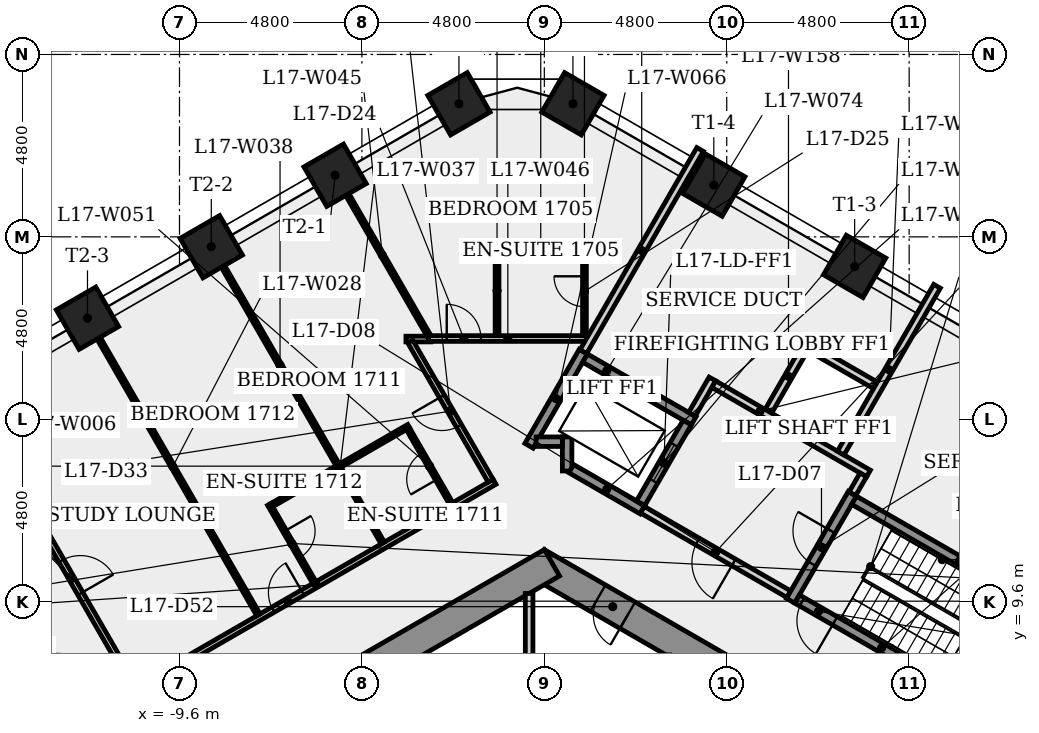
"""IFC4 building model, lengths in metres.
Left out: names, types, materials, properties, quantities, classifications, styles, units other than length and angle.
Written with IfcOpenShell. Run it as: python <this file> out.ifc"""

import sys

from ifc_helpers import new_model, si_unit, direction, frame, frame_2d, origin, origin_2d, place, context, subcontext, project, spatial, rectangle, extrude, element, fill, save


model = new_model("IFC4")
c1 = context("Model", 3, precision=1e-05, world=origin(), true_north=direction((0.0, 1.0)))
c2 = subcontext(c1, "Body", "Model", "MODEL_VIEW")
j1 = project(units=[si_unit("LENGTHUNIT", "METRE"), si_unit("PLANEANGLEUNIT", "RADIAN")], contexts=[c1])
p1 = place(None, origin())
s1 = spatial("IfcSite", under=j1, at=p1, CompositionType="ELEMENT")
p2 = place(p1, origin())
s2 = spatial("IfcBuilding", under=s1, at=p2, CompositionType="ELEMENT")
p3 = place(p2, frame((0.0, 0.0, 66.3)))
s3 = spatial("IfcBuildingStorey", under=s2, at=p3, CompositionType="ELEMENT", Elevation=66.3)
p4 = place(p3, frame((9.3, 5.138, 0.0), z_axis=(0.0, 0.0, 1.0), x_axis=(-0.866023993627, 0.500002442456, 0.0)))
e1 = element("IfcWall", 1, at=p4, inside=s3, PredefinedType="SHEAR", context=c2, shape_type="SweptSolid", body=[
    extrude(rectangle(XDim=10.97, YDim=0.8, at=frame_2d((5.485, 0.0))), origin(), (0.0, 0.0, 1.0), 4.0),
])
p5 = place(p4, frame((8.21, 0.0, 0.0)))
e2 = element("IfcOpeningElement", 2, at=p5, cuts=e1, PredefinedType="OPENING", context=c2, shape_type="SweptSolid", body=[
    extrude(rectangle(XDim=0.9, YDim=2.1, at=frame_2d((0.45, 1.05))), frame((0.0, 0.41, 0.0), z_axis=(0.0, -1.0, 0.0), x_axis=(1.0, 0.0, 0.0)), (0.0, 0.0, 1.0), 0.82),
])
p6 = place(p4, frame((2.126, 0.0, 0.0)))
e3 = element("IfcOpeningElement", 3, at=p6, cuts=e1, PredefinedType="OPENING", context=c2, shape_type="SweptSolid", body=[
    extrude(rectangle(XDim=0.9, YDim=2.1, at=frame_2d((0.45, 1.05))), frame((0.0, 0.41, 0.0), z_axis=(0.0, -1.0, 0.0), x_axis=(1.0, 0.0, 0.0)), (0.0, 0.0, 1.0), 0.82),
])
p7 = place(p3, frame((0.2, 10.623, 0.0), z_axis=(0.0, 0.0, 1.0), x_axis=(-0.866023993627, -0.500002442456, 0.0)))
e4 = element("IfcWall", 4, at=p7, inside=s3, PredefinedType="SHEAR", context=c2, shape_type="SweptSolid", body=[
    extrude(rectangle(XDim=10.97, YDim=0.8, at=frame_2d((5.485, 0.0))), origin(), (0.0, 0.0, 1.0), 4.0),
])
p8 = place(p7, frame((6.877, 0.0, 0.0)))
e5 = element("IfcOpeningElement", 5, at=p8, cuts=e4, PredefinedType="OPENING", context=c2, shape_type="SweptSolid", body=[
    extrude(rectangle(XDim=0.9, YDim=2.1, at=frame_2d((0.45, 1.05))), frame((0.0, 0.41, 0.0), z_axis=(0.0, -1.0, 0.0), x_axis=(1.0, 0.0, 0.0)), (0.0, 0.0, 1.0), 0.82),
])
for number, where, z_axis, x_axis in (
    (6, (8.166, 18.423, 0.0), (0.0, 0.0, 1.0), (0.5, 0.866, 0.0)),
    (7, (4.459, 20.563, 0.0), (0.0, 0.0, 1.0), (0.5, 0.866, 0.0)),
    (8, (0.753, 22.703, 0.0), (0.0, 0.0, 1.0), (0.5, 0.866, 0.0)),
    (9, (-2.247, 22.703, 0.0), (0.0, 0.0, 1.0), (-0.5, 0.866, 0.0)),
    (10, (-5.505, 20.822, 0.0), (0.0, 0.0, 1.0), (-0.5, 0.866, 0.0)),
    (11, (-8.763, 18.94, 0.0), (0.0, 0.0, 1.0), (-0.5, 0.866, 0.0)),
    (12, (-12.021, 17.06, 0.0), (0.0, 0.0, 1.0), (-0.5, 0.866, 0.0)),
):
    element("IfcColumn", number, at=place(p3, frame(where, z_axis=z_axis, x_axis=x_axis)), inside=s3, PredefinedType="COLUMN", context=c2, shape_type="SweptSolid", body=[
        extrude(rectangle(XDim=1.2, YDim=1.2, at=origin_2d()), origin(), (0.0, 0.0, 1.0), 4.0),
    ])
p9 = place(p3, frame((-14.161, 13.192, 0.0), z_axis=(0.0, 0.0, 1.0), x_axis=(0.500005038635, -0.866022494708, 0.0)))
e13 = element("IfcWall", 13, at=p9, inside=s3, PredefinedType="PARTITIONING", context=c2, shape_type="SweptSolid", body=[
    extrude(rectangle(XDim=6.88, YDim=0.15, at=frame_2d((3.44, 0.0))), origin(), (0.0, 0.0, 1.0), 3.6),
])
p10 = place(p9, frame((2.903, 0.0, 0.0)))
e14 = element("IfcOpeningElement", 14, at=p10, cuts=e13, PredefinedType="OPENING", context=c2, shape_type="SweptSolid", body=[
    extrude(rectangle(XDim=1.0, YDim=2.1, at=frame_2d((0.5, 1.05))), frame((0.0, 0.085, 0.0), z_axis=(0.0, -1.0, 0.0), x_axis=(1.0, 0.0, 0.0)), (0.0, 0.0, 1.0), 0.17),
])
p11 = place(p3, frame((-10.693, 7.336, 0.0), z_axis=(0.0, 0.0, 1.0), x_axis=(0.866018601944, 0.500011780947, 0.0)))
e15 = element("IfcWall", 15, at=p11, inside=s3, PredefinedType="PARTITIONING", context=c2, shape_type="SweptSolid", body=[
    extrude(rectangle(XDim=10.835, YDim=0.15, at=frame_2d((5.417, 0.0))), origin(), (0.0, 0.0, 1.0), 3.6),
])
p12 = place(p11, frame((4.103, 0.0, 0.0)))
e16 = element("IfcOpeningElement", 16, at=p12, cuts=e15, PredefinedType="OPENING", context=c2, shape_type="SweptSolid", body=[
    extrude(rectangle(XDim=0.9, YDim=2.1, at=frame_2d((0.45, 1.05))), frame((0.0, 0.085, 0.0), z_axis=(0.0, -1.0, 0.0), x_axis=(1.0, 0.0, 0.0)), (0.0, 0.0, 1.0), 0.17),
])
p13 = place(p3, frame((-7.523, 9.253, 0.0), z_axis=(0.0, 0.0, 1.0), x_axis=(-0.500009404554, 0.866019973994, 0.0)))
e17 = element("IfcWall", 17, at=p13, inside=s3, PredefinedType="PARTITIONING", context=c2, shape_type="SweptSolid", body=[
    extrude(rectangle(XDim=9.01, YDim=0.1, at=frame_2d((4.505, 0.0))), origin(), (0.0, 0.0, 1.0), 3.6),
])
p14 = place(p3, frame((-7.239, 12.16, 0.0), z_axis=(0.0, 0.0, 1.0), x_axis=(0.499986429846, -0.866033238375, 0.0)))
e18 = element("IfcWall", 18, at=p14, inside=s3, PredefinedType="PARTITIONING", context=c2, shape_type="SweptSolid", body=[
    extrude(rectangle(XDim=2.375, YDim=0.1, at=frame_2d((1.188, 0.0))), origin(), (0.0, 0.0, 1.0), 3.6),
])
p15 = place(p14, frame((0.812, 0.0, 0.0)))
e19 = element("IfcOpeningElement", 19, at=p15, cuts=e18, PredefinedType="OPENING", context=c2, shape_type="SweptSolid", body=[
    extrude(rectangle(XDim=0.8, YDim=2.1, at=frame_2d((0.4, 1.05))), frame((0.0, 0.06, 0.0), z_axis=(0.0, -1.0, 0.0), x_axis=(1.0, 0.0, 0.0)), (0.0, 0.0, 1.0), 0.12),
])
p16 = place(p3, frame((-7.17, 12.141, 0.0), z_axis=(0.0, 0.0, 1.0), x_axis=(0.866036909293, 0.499980071345, 0.0)))
e20 = element("IfcWall", 20, at=p16, inside=s3, PredefinedType="PARTITIONING", context=c2, shape_type="SweptSolid", body=[
    extrude(rectangle(XDim=4.156, YDim=0.1, at=frame_2d((2.078, 0.0))), origin(), (0.0, 0.0, 1.0), 3.6),
])
p17 = place(p3, frame((-8.756, 18.945, 0.0), z_axis=(0.0, 0.0, 1.0), x_axis=(0.500009404554, -0.866019973994, 0.0)))
e21 = element("IfcWall", 21, at=p17, inside=s3, PredefinedType="PARTITIONING", context=c2, shape_type="SweptSolid", body=[
    extrude(rectangle(XDim=9.01, YDim=0.1, at=frame_2d((4.505, 0.0))), origin(), (0.0, 0.0, 1.0), 3.6),
])
p18 = place(p3, frame((-3.641, 16.511, 0.0), z_axis=(0.0, 0.0, 1.0), x_axis=(1.0, 0.0, 0.0)))
e22 = element("IfcWall", 22, at=p18, inside=s3, PredefinedType="PARTITIONING", context=c2, shape_type="SweptSolid", body=[
    extrude(rectangle(XDim=0.652, YDim=0.15, at=frame_2d((0.326, 0.0))), origin(), (0.0, 0.0, 1.0), 3.6),
])
p19 = place(p3, frame((-3.034, 16.59, 0.0), z_axis=(0.0, 0.0, 1.0), x_axis=(-0.499975448907, 0.8660395779, 0.0)))
e23 = element("IfcWall", 23, at=p19, inside=s3, PredefinedType="PARTITIONING", context=c2, shape_type="SweptSolid", body=[
    extrude(rectangle(XDim=4.901, YDim=0.1, at=frame_2d((2.45, 0.0))), origin(), (0.0, 0.0, 1.0), 3.6),
])
p20 = place(p3, frame((-3.046, 16.525, 0.0), z_axis=(0.0, 0.0, 1.0), x_axis=(1.0, 0.0, 0.0)))
e24 = element("IfcWall", 24, at=p20, inside=s3, PredefinedType="PARTITIONING", context=c2, shape_type="SweptSolid", body=[
    extrude(rectangle(XDim=4.173, YDim=0.15, at=frame_2d((2.086, 0.0))), origin(), (0.0, 0.0, 1.0), 3.6),
])
p21 = place(p20, frame((0.479, 0.0, 0.0)))
e25 = element("IfcOpeningElement", 25, at=p21, cuts=e24, PredefinedType="OPENING", context=c2, shape_type="SweptSolid", body=[
    extrude(rectangle(XDim=0.9, YDim=2.1, at=frame_2d((0.45, 1.05))), frame((0.0, 0.085, 0.0), z_axis=(0.0, -1.0, 0.0), x_axis=(1.0, 0.0, 0.0)), (0.0, 0.0, 1.0), 0.17),
])
p22 = place(p3, frame((-2.452, 12.181, 0.0), z_axis=(0.0, 0.0, 1.0), x_axis=(-0.499982560684, 0.866035472144, 0.0)))
e26 = element("IfcWall", 26, at=p22, inside=s3, PredefinedType="PARTITIONING", context=c2, shape_type="SweptSolid", body=[
    extrude(rectangle(XDim=2.275, YDim=0.1, at=frame_2d((1.137, 0.0))), origin(), (0.0, 0.0, 1.0), 3.6),
])
p23 = place(p22, frame((0.738, 0.0, 0.0)))
e27 = element("IfcOpeningElement", 27, at=p23, cuts=e26, PredefinedType="OPENING", context=c2, shape_type="SweptSolid", body=[
    extrude(rectangle(XDim=0.8, YDim=2.1, at=frame_2d((0.4, 1.05))), frame((0.0, 0.06, 0.0), z_axis=(0.0, -1.0, 0.0), x_axis=(1.0, 0.0, 0.0)), (0.0, 0.0, 1.0), 0.12),
])
p24 = place(p3, frame((-1.412, 12.781, 0.0), z_axis=(0.0, 0.0, 1.0), x_axis=(-0.499992114976, 0.866029956157, 0.0)))
e28 = element("IfcWall", 28, at=p24, inside=s3, PredefinedType="PARTITIONING", context=c2, shape_type="SweptSolid", body=[
    extrude(rectangle(XDim=4.232, YDim=0.15, at=frame_2d((2.116, 0.0))), origin(), (0.0, 0.0, 1.0), 3.6),
])
p25 = place(p24, frame((1.666, 0.0, 0.0)))
e29 = element("IfcOpeningElement", 29, at=p25, cuts=e28, PredefinedType="OPENING", context=c2, shape_type="SweptSolid", body=[
    extrude(rectangle(XDim=0.9, YDim=2.1, at=frame_2d((0.45, 1.05))), frame((0.0, 0.085, 0.0), z_axis=(0.0, -1.0, 0.0), x_axis=(1.0, 0.0, 0.0)), (0.0, 0.0, 1.0), 0.17),
])
p26 = place(p3, frame((-1.244, 18.975, 0.0), z_axis=(0.0, 0.0, 1.0), x_axis=(0.0, -1.0, 0.0)))
e30 = element("IfcWall", 30, at=p26, inside=s3, PredefinedType="PARTITIONING", context=c2, shape_type="SweptSolid", body=[
    extrude(rectangle(XDim=2.375, YDim=0.1, at=frame_2d((1.188, 0.0))), origin(), (0.0, 0.0, 1.0), 3.6),
])
p27 = place(p3, frame((-0.4, 9.815, 0.0), z_axis=(0.0, 0.0, 1.0), x_axis=(0.0, -1.0, 0.0)))
e31 = element("IfcWall", 31, at=p27, inside=s3, PredefinedType="PARTITIONING", context=c2, shape_type="SweptSolid", body=[
    extrude(rectangle(XDim=4.54, YDim=0.2, at=frame_2d((2.27, 0.0))), origin(), (0.0, 0.0, 1.0), 3.6),
])
p28 = place(p3, frame((-0.403, 13.702, 0.0), z_axis=(0.0, 0.0, 1.0), x_axis=(0.499976111731, 0.866039195244, 0.0)))
e32 = element("IfcWall", 32, at=p28, inside=s3, PredefinedType="SHEAR", context=c2, shape_type="SweptSolid", body=[
    extrude(rectangle(XDim=2.861, YDim=0.25, at=frame_2d((1.43, 0.0))), origin(), (0.0, 0.0, 1.0), 3.6),
])
p29 = place(p3, frame((0.6, 13.039, 0.0), z_axis=(0.0, 0.0, 1.0), x_axis=(0.0, 1.0, 0.0)))
e33 = element("IfcWall", 33, at=p29, inside=s3, PredefinedType="SHEAR", context=c2, shape_type="SweptSolid", body=[
    extrude(rectangle(XDim=0.896, YDim=0.25, at=frame_2d((0.448, 0.0))), origin(), (0.0, 0.0, 1.0), 3.6),
])
p30 = place(p3, frame((0.475, 13.81, 0.0), z_axis=(0.0, 0.0, 1.0), x_axis=(-1.0, 0.0, 0.0)))
e34 = element("IfcWall", 34, at=p30, inside=s3, PredefinedType="SHEAR", context=c2, shape_type="SweptSolid", body=[
    extrude(rectangle(XDim=0.691, YDim=0.25, at=frame_2d((0.345, 0.0))), origin(), (0.0, 0.0, 1.0), 4.0),
])
p31 = place(p3, frame((1.073, 16.008, 0.0), z_axis=(0.0, 0.0, 1.0), x_axis=(0.866040211805, -0.499974350878, 0.0)))
e35 = element("IfcWall", 35, at=p31, inside=s3, PredefinedType="SHEAR", context=c2, shape_type="SweptSolid", body=[
    extrude(rectangle(XDim=3.3, YDim=0.25, at=frame_2d((1.65, 0.0))), origin(), (0.0, 0.0, 1.0), 3.6),
])
p32 = place(p3, frame((1.027, 16.179, 0.0), z_axis=(0.0, 0.0, 1.0), x_axis=(0.499994205574, 0.866028749172, 0.0)))
e36 = element("IfcWall", 36, at=p32, inside=s3, PredefinedType="PLUMBINGWALL", context=c2, shape_type="SweptSolid", body=[
    extrude(rectangle(XDim=6.144, YDim=0.2, at=frame_2d((3.072, 0.0))), origin(), (0.0, 0.0, 1.0), 3.6),
])
p33 = place(p3, frame((1.056, 16.6, 0.0), z_axis=(0.0, 0.0, 1.0), x_axis=(0.0, 1.0, 0.0)))
e37 = element("IfcWall", 37, at=p33, inside=s3, PredefinedType="PARTITIONING", context=c2, shape_type="SweptSolid", body=[
    extrude(rectangle(XDim=2.375, YDim=0.1, at=frame_2d((1.188, 0.0))), origin(), (0.0, 0.0, 1.0), 3.6),
])
p34 = place(p33, frame((0.762, 0.0, 0.0)))
e38 = element("IfcOpeningElement", 38, at=p34, cuts=e37, PredefinedType="OPENING", context=c2, shape_type="SweptSolid", body=[
    extrude(rectangle(XDim=0.8, YDim=2.1, at=frame_2d((0.4, 1.05))), frame((0.0, 0.06, 0.0), z_axis=(0.0, -1.0, 0.0), x_axis=(1.0, 0.0, 0.0)), (0.0, 0.0, 1.0), 0.12),
])
p35 = place(p3, frame((1.006, 18.925, 0.0), z_axis=(0.0, 0.0, 1.0), x_axis=(-1.0, 0.0, 0.0)))
e39 = element("IfcWall", 39, at=p35, inside=s3, PredefinedType="PARTITIONING", context=c2, shape_type="SweptSolid", body=[
    extrude(rectangle(XDim=2.2, YDim=0.1, at=frame_2d((1.1, 0.0))), origin(), (0.0, 0.0, 1.0), 3.6),
])
p36 = place(p3, frame((2.581, 12.02, 0.0), z_axis=(0.0, 0.0, 1.0), x_axis=(-0.86603892542, 0.499976579108, 0.0)))
e40 = element("IfcWall", 40, at=p36, inside=s3, PredefinedType="SHEAR", context=c2, shape_type="SweptSolid", body=[
    extrude(rectangle(XDim=2.162, YDim=0.25, at=frame_2d((1.081, 0.0))), origin(), (0.0, 0.0, 1.0), 3.6),
])
p37 = place(p3, frame((2.535, 12.191, 0.0), z_axis=(0.0, 0.0, 1.0), x_axis=(0.500061746146, 0.865989751695, 0.0)))
e41 = element("IfcWall", 41, at=p37, inside=s3, PredefinedType="SHEAR", context=c2, shape_type="SweptSolid", body=[
    extrude(rectangle(XDim=2.45, YDim=0.25, at=frame_2d((1.225, 0.0))), origin(), (0.0, 0.0, 1.0), 4.0),
])
p38 = place(p37, frame((0.675, 0.0, 0.0)))
e42 = element("IfcOpeningElement", 42, at=p38, cuts=e41, PredefinedType="OPENING", context=c2, shape_type="SweptSolid", body=[
    extrude(rectangle(XDim=1.1, YDim=2.1, at=frame_2d((0.55, 1.05))), frame((0.0, 0.135, 0.0), z_axis=(0.0, -1.0, 0.0), x_axis=(1.0, 0.0, 0.0)), (0.0, 0.0, 1.0), 0.27),
])
p39 = place(p3, frame((3.885, 14.529, 0.0), z_axis=(0.0, 0.0, 1.0), x_axis=(0.499997628298, 0.866026773083, 0.0)))
e43 = element("IfcWall", 43, at=p39, inside=s3, PredefinedType="PLUMBINGWALL", context=c2, shape_type="SweptSolid", body=[
    extrude(rectangle(XDim=1.075, YDim=0.2, at=frame_2d((0.538, 0.0))), origin(), (0.0, 0.0, 1.0), 3.6),
])
p40 = place(p3, frame((4.459, 15.323, 0.0), z_axis=(0.0, 0.0, 1.0), x_axis=(0.866016039709, -0.500016218704, 0.0)))
e44 = element("IfcWall", 44, at=p40, inside=s3, PredefinedType="PLUMBINGWALL", context=c2, shape_type="SweptSolid", body=[
    extrude(rectangle(XDim=4.7, YDim=0.2, at=frame_2d((2.35, 0.0))), origin(), (0.0, 0.0, 1.0), 3.6),
])
p41 = place(p3, frame((6.435, 9.795, 0.0), z_axis=(0.0, 0.0, 1.0), x_axis=(-0.866012907634, 0.500021643343, 0.0)))
e45 = element("IfcWall", 45, at=p41, inside=s3, PredefinedType="PARTITIONING", context=c2, shape_type="SweptSolid", body=[
    extrude(rectangle(XDim=4.45, YDim=0.2, at=frame_2d((2.225, 0.0))), origin(), (0.0, 0.0, 1.0), 3.6),
])
p42 = place(p41, frame((1.675, 0.0, 0.0)))
e46 = element("IfcOpeningElement", 46, at=p42, cuts=e45, PredefinedType="OPENING", context=c2, shape_type="SweptSolid", body=[
    extrude(rectangle(XDim=1.1, YDim=2.1, at=frame_2d((0.55, 1.05))), frame((0.0, 0.11, 0.0), z_axis=(0.0, -1.0, 0.0), x_axis=(1.0, 0.0, 0.0)), (0.0, 0.0, 1.0), 0.22),
])
p43 = place(p3, frame((6.48, 9.624, 0.0), z_axis=(0.0, 0.0, 1.0), x_axis=(0.500017246033, 0.866015446554, 0.0)))
e47 = element("IfcWall", 47, at=p43, inside=s3, PredefinedType="SHEAR", context=c2, shape_type="SweptSolid", body=[
    extrude(rectangle(XDim=3.25, YDim=0.25, at=frame_2d((1.625, 0.0))), origin(), (0.0, 0.0, 1.0), 3.6),
])
p44 = place(p43, frame((1.125, 0.0, 0.0)))
e48 = element("IfcOpeningElement", 48, at=p44, cuts=e47, PredefinedType="OPENING", context=c2, shape_type="SweptSolid", body=[
    extrude(rectangle(XDim=1.0, YDim=2.1, at=frame_2d((0.5, 1.05))), frame((0.0, 0.135, 0.0), z_axis=(0.0, -1.0, 0.0), x_axis=(1.0, 0.0, 0.0)), (0.0, 0.0, 1.0), 0.27),
])
p45 = place(p3, frame((7.8, 13.51, 0.0), z_axis=(0.0, 0.0, 1.0), x_axis=(0.499993479487, 0.866029168372, 0.0)))
e49 = element("IfcWall", 49, at=p45, inside=s3, PredefinedType="PLUMBINGWALL", context=c2, shape_type="SweptSolid", body=[
    extrude(rectangle(XDim=5.068, YDim=0.2, at=frame_2d((2.534, 0.0))), origin(), (0.0, 0.0, 1.0), 3.6),
])
p46 = place(p3, frame((8.151, 12.268, 0.0), z_axis=(0.0, 0.0, 1.0), x_axis=(0.866025499775, -0.499999833739, 0.0)))
e50 = element("IfcWall", 50, at=p46, inside=s3, PredefinedType="SHEAR", context=c2, shape_type="SweptSolid", body=[
    extrude(rectangle(XDim=6.4, YDim=0.25, at=frame_2d((3.2, 0.0))), origin(), (0.0, 0.0, 1.0), 3.6),
])
p47 = place(p3, frame((8.393, 12.937, 0.0), z_axis=(0.0, 0.0, 1.0), x_axis=(-0.500065409566, -0.86598763626, 0.0)))
e51 = element("IfcWall", 51, at=p47, inside=s3, PredefinedType="PLUMBINGWALL", context=c2, shape_type="SweptSolid", body=[
    extrude(rectangle(XDim=0.575, YDim=0.2, at=frame_2d((0.288, 0.0))), origin(), (0.0, 0.0, 1.0), 3.6),
])
p48 = place(p3, frame((11.1, 7.101, 0.0), z_axis=(0.0, 0.0, 1.0), x_axis=(-0.8660265141, 0.499998076872, 0.0)))
e52 = element("IfcWall", 52, at=p48, inside=s3, PredefinedType="SHEAR", context=c2, shape_type="SweptSolid", body=[
    extrude(rectangle(XDim=5.137, YDim=0.25, at=frame_2d((2.569, 0.0))), origin(), (0.0, 0.0, 1.0), 3.6),
])
p49 = place(p48, frame((3.987, 0.0, 0.0)))
e53 = element("IfcOpeningElement", 53, at=p49, cuts=e52, PredefinedType="OPENING", context=c2, shape_type="SweptSolid", body=[
    extrude(rectangle(XDim=1.0, YDim=2.1, at=frame_2d((0.5, 1.05))), frame((0.0, 0.135, 0.0), z_axis=(0.0, -1.0, 0.0), x_axis=(1.0, 0.0, 0.0)), (0.0, 0.0, 1.0), 0.27),
])
p50 = place(p3, frame((5.905, 14.627, 0.0), z_axis=(0.0, 0.0, 1.0), x_axis=(0.499888406853, 0.866089822532, 0.0)))
e54 = element("IfcWall", 54, at=p50, inside=s3, PredefinedType="PLUMBINGWALL", context=c2, shape_type="SweptSolid", body=[
    extrude(rectangle(XDim=2.08, YDim=0.2, at=frame_2d((1.04, 0.0))), origin(), (0.0, 0.0, 1.0), 3.6),
])
p51 = place(p3, frame((6.981, 16.292, 0.0), z_axis=(0.0, 0.0, 1.0), x_axis=(0.866041862775, -0.499971491109, 0.0)))
e55 = element("IfcWall", 55, at=p51, inside=s3, PredefinedType="PLUMBINGWALL", context=c2, shape_type="SweptSolid", body=[
    extrude(rectangle(XDim=1.98, YDim=0.2, at=frame_2d((0.99, 0.0))), origin(), (0.0, 0.0, 1.0), 3.6),
])
p52 = place(p49, origin())
e56 = element("IfcDoor", 56, at=p52, inside=s3, OperationType="SINGLE_SWING_LEFT", PredefinedType="DOOR", context=c2, shape_type="SweptSolid", body=[
    extrude(rectangle(XDim=1.0, YDim=2.1, at=frame_2d((0.5, 1.05))), frame((0.0, 0.025, 0.0), z_axis=(0.0, -1.0, 0.0), x_axis=(1.0, 0.0, 0.0)), (0.0, 0.0, 1.0), 0.05),
])
fill(e53, e56)
p53 = place(p44, origin())
e57 = element("IfcDoor", 57, at=p53, inside=s3, OperationType="SINGLE_SWING_RIGHT", PredefinedType="DOOR", context=c2, shape_type="SweptSolid", body=[
    extrude(rectangle(XDim=1.0, YDim=2.1, at=frame_2d((0.5, 1.05))), frame((0.0, 0.025, 0.0), z_axis=(0.0, -1.0, 0.0), x_axis=(1.0, 0.0, 0.0)), (0.0, 0.0, 1.0), 0.05),
])
fill(e48, e57)
p54 = place(p42, origin())
e58 = element("IfcDoor", 58, at=p54, inside=s3, OperationType="SINGLE_SWING_LEFT", PredefinedType="DOOR", context=c2, shape_type="SweptSolid", body=[
    extrude(rectangle(XDim=1.1, YDim=2.1, at=frame_2d((0.55, 1.05))), frame((0.0, 0.025, 0.0), z_axis=(0.0, -1.0, 0.0), x_axis=(1.0, 0.0, 0.0)), (0.0, 0.0, 1.0), 0.05),
])
fill(e46, e58)
p55 = place(p38, origin())
e59 = element("IfcDoor", 59, at=p55, inside=s3, OperationType="SLIDING_TO_LEFT", PredefinedType="DOOR", context=c2, shape_type="SweptSolid", body=[
    extrude(rectangle(XDim=1.1, YDim=2.1, at=frame_2d((0.55, 1.05))), frame((0.0, 0.025, 0.0), z_axis=(0.0, -1.0, 0.0), x_axis=(1.0, 0.0, 0.0)), (0.0, 0.0, 1.0), 0.05),
])
fill(e42, e59)
p56 = place(p21, origin())
e60 = element("IfcDoor", 60, at=p56, inside=s3, OperationType="SINGLE_SWING_LEFT", PredefinedType="DOOR", context=c2, shape_type="SweptSolid", body=[
    extrude(rectangle(XDim=0.9, YDim=2.1, at=frame_2d((0.45, 1.05))), frame((0.0, 0.025, 0.0), z_axis=(0.0, -1.0, 0.0), x_axis=(1.0, 0.0, 0.0)), (0.0, 0.0, 1.0), 0.05),
])
fill(e25, e60)
p57 = place(p34, origin())
e61 = element("IfcDoor", 61, at=p57, inside=s3, OperationType="SINGLE_SWING_RIGHT", PredefinedType="DOOR", context=c2, shape_type="SweptSolid", body=[
    extrude(rectangle(XDim=0.8, YDim=2.1, at=frame_2d((0.4, 1.05))), frame((0.0, 0.025, 0.0), z_axis=(0.0, -1.0, 0.0), x_axis=(1.0, 0.0, 0.0)), (0.0, 0.0, 1.0), 0.05),
])
fill(e38, e61)
p58 = place(p25, origin())
e62 = element("IfcDoor", 62, at=p58, inside=s3, OperationType="SINGLE_SWING_RIGHT", PredefinedType="DOOR", context=c2, shape_type="SweptSolid", body=[
    extrude(rectangle(XDim=0.9, YDim=2.1, at=frame_2d((0.45, 1.05))), frame((0.0, 0.025, 0.0), z_axis=(0.0, -1.0, 0.0), x_axis=(1.0, 0.0, 0.0)), (0.0, 0.0, 1.0), 0.05),
])
fill(e29, e62)
p59 = place(p23, origin())
e63 = element("IfcDoor", 63, at=p59, inside=s3, OperationType="SINGLE_SWING_LEFT", PredefinedType="DOOR", context=c2, shape_type="SweptSolid", body=[
    extrude(rectangle(XDim=0.8, YDim=2.1, at=frame_2d((0.4, 1.05))), frame((0.0, 0.025, 0.0), z_axis=(0.0, -1.0, 0.0), x_axis=(1.0, 0.0, 0.0)), (0.0, 0.0, 1.0), 0.05),
])
fill(e27, e63)
p60 = place(p12, origin())
e64 = element("IfcDoor", 64, at=p60, inside=s3, OperationType="SINGLE_SWING_RIGHT", PredefinedType="DOOR", context=c2, shape_type="SweptSolid", body=[
    extrude(rectangle(XDim=0.9, YDim=2.1, at=frame_2d((0.45, 1.05))), frame((0.0, 0.025, 0.0), z_axis=(0.0, -1.0, 0.0), x_axis=(1.0, 0.0, 0.0)), (0.0, 0.0, 1.0), 0.05),
])
fill(e16, e64)
p61 = place(p15, origin())
e65 = element("IfcDoor", 65, at=p61, inside=s3, OperationType="SINGLE_SWING_LEFT", PredefinedType="DOOR", context=c2, shape_type="SweptSolid", body=[
    extrude(rectangle(XDim=0.8, YDim=2.1, at=frame_2d((0.4, 1.05))), frame((0.0, 0.025, 0.0), z_axis=(0.0, -1.0, 0.0), x_axis=(1.0, 0.0, 0.0)), (0.0, 0.0, 1.0), 0.05),
])
fill(e19, e65)
p62 = place(p10, origin())
e66 = element("IfcDoor", 66, at=p62, inside=s3, OperationType="SINGLE_SWING_RIGHT", PredefinedType="DOOR", context=c2, shape_type="SweptSolid", body=[
    extrude(rectangle(XDim=1.0, YDim=2.1, at=frame_2d((0.5, 1.05))), frame((0.0, 0.025, 0.0), z_axis=(0.0, -1.0, 0.0), x_axis=(1.0, 0.0, 0.0)), (0.0, 0.0, 1.0), 0.05),
])
fill(e14, e66)
p63 = place(p5, origin())
e67 = element("IfcDoor", 67, at=p63, inside=s3, OperationType="SINGLE_SWING_LEFT", PredefinedType="DOOR", context=c2, shape_type="SweptSolid", body=[
    extrude(rectangle(XDim=0.9, YDim=2.1, at=frame_2d((0.45, 1.05))), frame((0.0, 0.025, 0.0), z_axis=(0.0, -1.0, 0.0), x_axis=(1.0, 0.0, 0.0)), (0.0, 0.0, 1.0), 0.05),
])
fill(e2, e67)
save(model, sys.argv[1])
